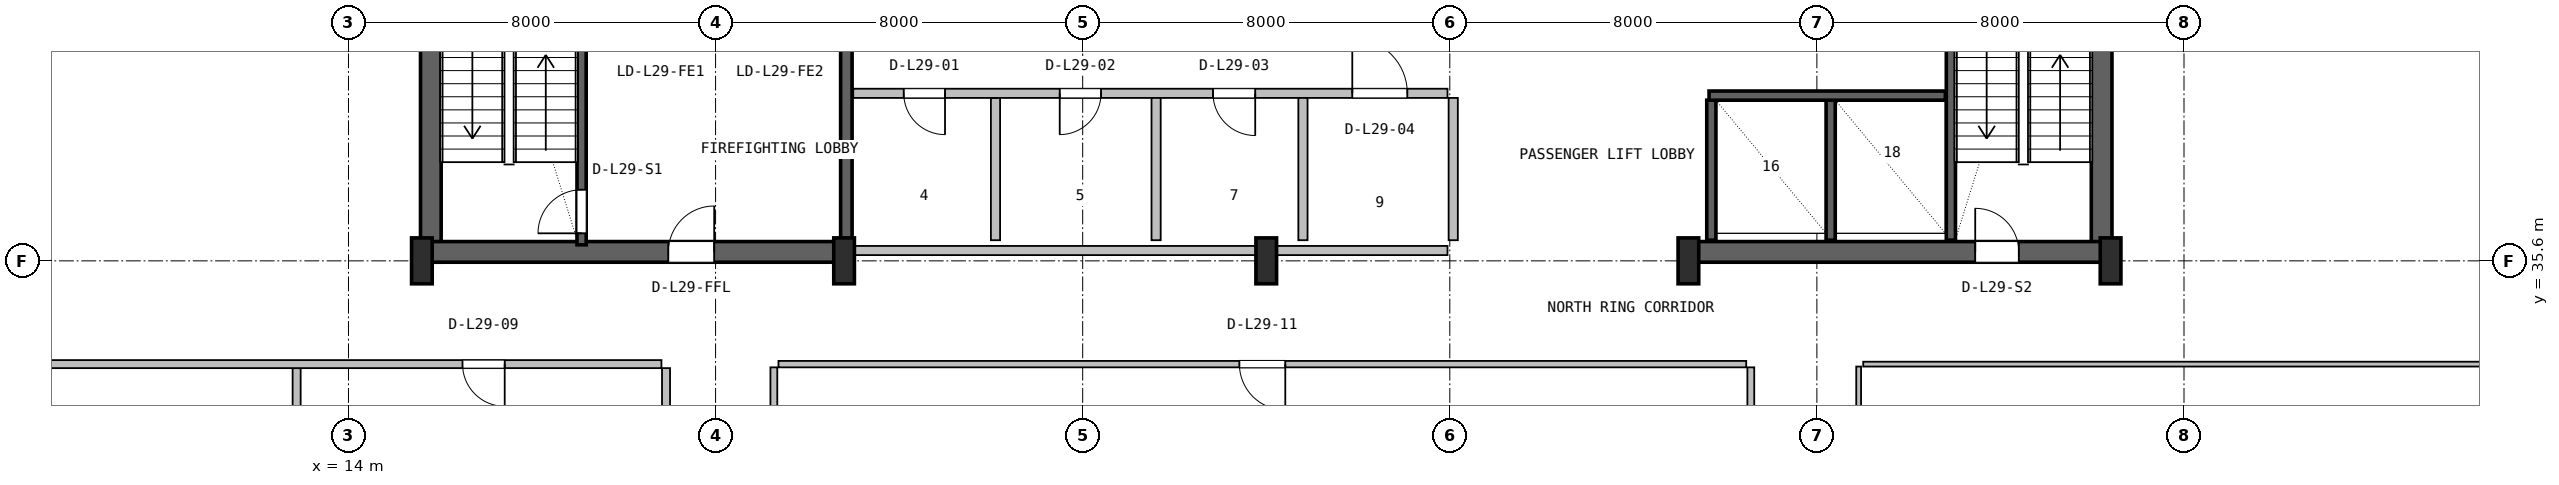
"""IFC4 building model, lengths in metres.
Left out: names, types, materials, properties, quantities, classifications, styles, units other than length and angle.
Written with IfcOpenShell. Run it as: python <this file> out.ifc"""

import sys

from ifc_helpers import new_model, si_unit, direction, frame, frame_2d, origin, origin_2d, place, context, subcontext, project, spatial, rectangle, i_section, extrude, source, transform, mapped, element, fill, save


model = new_model("IFC4")
c1 = context("Model", 3, precision=1e-05, world=origin(), true_north=direction((0.0, 1.0)))
c2 = subcontext(c1, "Body", "Model", "MODEL_VIEW")
j1 = project(units=[si_unit("LENGTHUNIT", "METRE"), si_unit("PLANEANGLEUNIT", "RADIAN")], contexts=[c1])
p1 = place(None, origin())
s1 = spatial("IfcSite", under=j1, at=p1, CompositionType="ELEMENT")
p2 = place(p1, origin())
s2 = spatial("IfcBuilding", under=s1, at=p2, CompositionType="ELEMENT")
p3 = place(p2, frame((0.0, 0.0, 122.0)))
s3 = spatial("IfcBuildingStorey", under=s2, at=p3, CompositionType="ELEMENT", Elevation=122.0)
for number, where, z_axis, x_axis in (
    (1, (15.795, 35.57, 0.0), (0.0, 0.0, 1.0), (0.0, 1.0, 0.0)),
    (2, (52.205, 35.57, 0.0), (0.0, 0.0, 1.0), (0.0, 1.0, 0.0)),
):
    element("IfcWall", number, at=place(p3, frame(where, z_axis=z_axis, x_axis=x_axis)), inside=s3, PredefinedType="SHEAR", context=c2, shape_type="SweptSolid", body=[
        extrude(rectangle(XDim=11.23, YDim=0.45, at=frame_2d((5.615, 0.0))), origin(), (0.0, 0.0, 1.0), 3.55),
    ])
p4 = place(p3, frame((15.57, 35.795, 0.0), z_axis=(0.0, 0.0, 1.0), x_axis=(1.0, 0.0, 0.0)))
e3 = element("IfcWall", 3, at=p4, inside=s3, PredefinedType="SHEAR", context=c2, shape_type="SweptSolid", body=[
    extrude(rectangle(XDim=9.23, YDim=0.45, at=frame_2d((4.615, 0.0))), origin(), (0.0, 0.0, 1.0), 3.55),
])
p5 = place(p4, frame((5.4, 0.0, 0.0)))
e4 = element("IfcOpeningElement", 4, at=p5, cuts=e3, PredefinedType="OPENING", context=c2, shape_type="SweptSolid", body=[
    extrude(rectangle(XDim=1.0, YDim=2.1, at=frame_2d((0.5, 1.05))), frame((0.0, 0.235, 0.0), z_axis=(0.0, -1.0, 0.0), x_axis=(1.0, 0.0, 0.0)), (0.0, 0.0, 1.0), 0.47),
])
p6 = place(p3, frame((43.2, 35.795, 0.0), z_axis=(0.0, 0.0, 1.0), x_axis=(1.0, 0.0, 0.0)))
e5 = element("IfcWall", 5, at=p6, inside=s3, PredefinedType="SHEAR", context=c2, shape_type="SweptSolid", body=[
    extrude(rectangle(XDim=9.23, YDim=0.45, at=frame_2d((4.615, 0.0))), origin(), (0.0, 0.0, 1.0), 3.55),
])
p7 = place(p6, frame((6.25, 0.0, 0.0)))
e6 = element("IfcOpeningElement", 6, at=p7, cuts=e5, PredefinedType="OPENING", context=c2, shape_type="SweptSolid", body=[
    extrude(rectangle(XDim=0.95, YDim=2.1, at=frame_2d((0.475, 1.05))), frame((0.0, 0.235, 0.0), z_axis=(0.0, -1.0, 0.0), x_axis=(1.0, 0.0, 0.0)), (0.0, 0.0, 1.0), 0.47),
])
m1 = source(origin(), c2, "Body", "SweptSolid", [
    extrude(i_section(OverallWidth=0.45, OverallDepth=1.0, WebThickness=0.016, FlangeThickness=0.03, FilletRadius=0.016, at=origin_2d()), origin(), (0.0, 0.0, 1.0), 3.8),
])
for number, where, z_axis, x_axis in (
    (7, (15.6, 35.6, 0.0), (0.0, 0.0, 1.0), (1.0, 0.0, 0.0)),
    (8, (24.8, 35.6, 0.0), (0.0, 0.0, 1.0), (1.0, 0.0, 0.0)),
    (9, (34.0, 35.6, 0.0), (0.0, 0.0, 1.0), (1.0, 0.0, 0.0)),
    (10, (43.2, 35.6, 0.0), (0.0, 0.0, 1.0), (1.0, 0.0, 0.0)),
    (11, (52.4, 35.6, 0.0), (0.0, 0.0, 1.0), (1.0, 0.0, 0.0)),
):
    element("IfcColumn", number, at=place(p3, frame(where, z_axis=z_axis, x_axis=x_axis)), inside=s3, PredefinedType="COLUMN", context=c2, shape_type="MappedRepresentation", body=[
        mapped(m1, transform((0.0, 0.0, 0.0), x_axis=(1.0, 0.0, 0.0), y_axis=(0.0, 1.0, 0.0), z_axis=(0.0, 0.0, 1.0), scale=1.0)),
    ])
p8 = place(p3, frame((19.08, 35.95, 0.0), z_axis=(0.0, 0.0, 1.0), x_axis=(0.0, 1.0, 0.0)))
e12 = element("IfcWall", 12, at=p8, inside=s3, PredefinedType="SHEAR", context=c2, shape_type="SweptSolid", body=[
    extrude(rectangle(XDim=9.65, YDim=0.2, at=frame_2d((4.825, 0.0))), origin(), (0.0, 0.0, 1.0), 3.55),
])
p9 = place(p8, frame((0.25, 0.0, 0.0)))
e13 = element("IfcOpeningElement", 13, at=p9, cuts=e12, PredefinedType="OPENING", context=c2, shape_type="SweptSolid", body=[
    extrude(rectangle(XDim=0.95, YDim=2.1, at=frame_2d((0.475, 1.05))), frame((0.0, 0.11, 0.0), z_axis=(0.0, -1.0, 0.0), x_axis=(1.0, 0.0, 0.0)), (0.0, 0.0, 1.0), 0.22),
])
p10 = place(p3, frame((24.85, 36.05, 0.0), z_axis=(0.0, 0.0, 1.0), x_axis=(0.0, 1.0, 0.0)))
e14 = element("IfcWall", 14, at=p10, inside=s3, PredefinedType="SHEAR", context=c2, shape_type="SweptSolid", body=[
    extrude(rectangle(XDim=10.45, YDim=0.25, at=frame_2d((5.225, 0.0))), origin(), (0.0, 0.0, 1.0), 3.55),
])
p11 = place(p3, frame((48.92, 36.05, 0.0), z_axis=(0.0, 0.0, 1.0), x_axis=(0.0, 1.0, 0.0)))
e15 = element("IfcWall", 15, at=p11, inside=s3, PredefinedType="SHEAR", context=c2, shape_type="SweptSolid", body=[
    extrude(rectangle(XDim=10.5, YDim=0.2, at=frame_2d((5.25, 0.0))), origin(), (0.0, 0.0, 1.0), 3.55),
])
for number, where, z_axis, x_axis in (
    (16, (43.7, 36.05, 0.0), (0.0, 0.0, 1.0), (0.0, 1.0, 0.0)),
    (17, (46.3, 36.05, 0.0), (0.0, 0.0, 1.0), (0.0, 1.0, 0.0)),
):
    element("IfcWall", number, at=place(p3, frame(where, z_axis=z_axis, x_axis=x_axis)), inside=s3, PredefinedType="SHEAR", context=c2, shape_type="SweptSolid", body=[
        extrude(rectangle(XDim=3.05, YDim=0.2, at=frame_2d((1.525, 0.0))), origin(), (0.0, 0.0, 1.0), 3.55),
    ])
p12 = place(p3, frame((43.65, 39.2, 0.0), z_axis=(0.0, 0.0, 1.0), x_axis=(1.0, 0.0, 0.0)))
e18 = element("IfcWall", 18, at=p12, inside=s3, PredefinedType="SHEAR", context=c2, shape_type="SweptSolid", body=[
    extrude(rectangle(XDim=5.15, YDim=0.2, at=frame_2d((2.575, 0.0))), origin(), (0.0, 0.0, 1.0), 3.55),
])
p13 = place(p3, frame((25.0, 35.825, 0.0), z_axis=(0.0, 0.0, 1.0), x_axis=(1.0, 0.0, 0.0)))
e19 = element("IfcWall", 19, at=p13, inside=s3, PredefinedType="SOLIDWALL", context=c2, shape_type="SweptSolid", body=[
    extrude(rectangle(XDim=12.95, YDim=0.2, at=frame_2d((6.475, 0.0))), origin(), (0.0, 0.0, 1.0), 2.325),
])
p14 = place(p3, frame((28.1, 36.05, 0.0), z_axis=(0.0, 0.0, 1.0), x_axis=(0.0, 1.0, 0.0)))
e20 = element("IfcWall", 20, at=p14, inside=s3, PredefinedType="PLUMBINGWALL", context=c2, shape_type="SweptSolid", body=[
    extrude(rectangle(XDim=3.1, YDim=0.2, at=frame_2d((1.55, 0.0))), origin(), (0.0, 0.0, 1.0), 3.53),
])
p15 = place(p3, frame((25.0, 39.25, 0.0), z_axis=(0.0, 0.0, 1.0), x_axis=(1.0, 0.0, 0.0)))
e21 = element("IfcWall", 21, at=p15, inside=s3, PredefinedType="SOLIDWALL", context=c2, shape_type="SweptSolid", body=[
    extrude(rectangle(XDim=12.95, YDim=0.2, at=frame_2d((6.475, 0.0))), origin(), (0.0, 0.0, 1.0), 3.53),
])
p16 = place(p15, frame((1.1, 0.0, 0.0)))
e22 = element("IfcOpeningElement", 22, at=p16, cuts=e21, PredefinedType="OPENING", context=c2, shape_type="SweptSolid", body=[
    extrude(rectangle(XDim=0.9, YDim=2.06, at=frame_2d((0.45, 1.03))), frame((0.0, 0.11, 0.0), z_axis=(0.0, -1.0, 0.0), x_axis=(1.0, 0.0, 0.0)), (0.0, 0.0, 1.0), 0.22),
])
p17 = place(p15, frame((4.5, 0.0, 0.0)))
e23 = element("IfcOpeningElement", 23, at=p17, cuts=e21, PredefinedType="OPENING", context=c2, shape_type="SweptSolid", body=[
    extrude(rectangle(XDim=0.9, YDim=2.06, at=frame_2d((0.45, 1.03))), frame((0.0, 0.11, 0.0), z_axis=(0.0, -1.0, 0.0), x_axis=(1.0, 0.0, 0.0)), (0.0, 0.0, 1.0), 0.22),
])
p18 = place(p15, frame((7.84, 0.0, 0.0)))
e24 = element("IfcOpeningElement", 24, at=p18, cuts=e21, PredefinedType="OPENING", context=c2, shape_type="SweptSolid", body=[
    extrude(rectangle(XDim=0.92, YDim=2.08, at=frame_2d((0.46, 1.04))), frame((0.0, 0.11, 0.0), z_axis=(0.0, -1.0, 0.0), x_axis=(1.0, 0.0, 0.0)), (0.0, 0.0, 1.0), 0.22),
])
p19 = place(p15, frame((10.875, 0.0, 0.0)))
e25 = element("IfcOpeningElement", 25, at=p19, cuts=e21, PredefinedType="OPENING", context=c2, shape_type="SweptSolid", body=[
    extrude(rectangle(XDim=1.2, YDim=2.1, at=frame_2d((0.6, 1.05))), frame((0.0, 0.11, 0.0), z_axis=(0.0, -1.0, 0.0), x_axis=(1.0, 0.0, 0.0)), (0.0, 0.0, 1.0), 0.22),
])
p20 = place(p3, frame((31.6, 36.05, 0.0), z_axis=(0.0, 0.0, 1.0), x_axis=(0.0, 1.0, 0.0)))
e26 = element("IfcWall", 26, at=p20, inside=s3, PredefinedType="PLUMBINGWALL", context=c2, shape_type="SweptSolid", body=[
    extrude(rectangle(XDim=3.1, YDim=0.2, at=frame_2d((1.55, 0.0))), origin(), (0.0, 0.0, 1.0), 3.53),
])
for number, where, z_axis, x_axis in (
    (27, (34.8, 36.05, 0.0), (0.0, 0.0, 1.0), (0.0, 1.0, 0.0)),
    (28, (38.075, 36.05, 0.0), (0.0, 0.0, 1.0), (0.0, 1.0, 0.0)),
):
    element("IfcWall", number, at=place(p3, frame(where, z_axis=z_axis, x_axis=x_axis)), inside=s3, PredefinedType="SOLIDWALL", context=c2, shape_type="SweptSolid", body=[
        extrude(rectangle(XDim=3.1, YDim=0.2, at=frame_2d((1.55, 0.0))), origin(), (0.0, 0.0, 1.0), 3.53),
    ])
p21 = place(p3, frame((20.92, 13.47, 0.0), z_axis=(0.0, 0.0, 1.0), x_axis=(0.0, 1.0, 0.0)))
e29 = element("IfcWall", 29, at=p21, inside=s3, PredefinedType="PARTITIONING", context=c2, shape_type="SweptSolid", body=[
    extrude(rectangle(XDim=19.793, YDim=0.175, at=frame_2d((9.896, 0.0))), origin(), (0.0, 0.0, 1.0), 3.222),
])
p22 = place(p21, frame((5.775, 0.0, 0.0)))
e30 = element("IfcOpeningElement", 30, at=p22, cuts=e29, PredefinedType="OPENING", context=c2, shape_type="SweptSolid", body=[
    extrude(rectangle(XDim=1.05, YDim=2.1, at=frame_2d((0.525, 1.05))), frame((0.0, 0.098, 0.0), z_axis=(0.0, -1.0, 0.0), x_axis=(1.0, 0.0, 0.0)), (0.0, 0.0, 1.0), 0.195),
])
p23 = place(p3, frame((12.87, 26.127, 0.0), z_axis=(0.0, 0.0, 1.0), x_axis=(0.0, 1.0, 0.0)))
e31 = element("IfcWall", 31, at=p23, inside=s3, PredefinedType="PARTITIONING", context=c2, shape_type="SweptSolid", body=[
    extrude(rectangle(XDim=7.136, YDim=0.175, at=frame_2d((3.568, 0.0))), origin(), (0.0, 0.0, 1.0), 3.222),
])
p24 = place(p3, frame((4.68, 33.35, 0.0), z_axis=(0.0, 0.0, 1.0), x_axis=(1.0, 0.0, 0.0)))
e32 = element("IfcWall", 32, at=p24, inside=s3, PredefinedType="PARTITIONING", context=c2, shape_type="SweptSolid", body=[
    extrude(rectangle(XDim=16.14, YDim=0.175, at=frame_2d((8.07, 0.0))), origin(), (0.0, 0.0, 1.0), 3.108),
])
p25 = place(p24, frame((11.805, 0.0, 0.0)))
e33 = element("IfcOpeningElement", 33, at=p25, cuts=e32, PredefinedType="OPENING", context=c2, shape_type="SweptSolid", body=[
    extrude(rectangle(XDim=0.92, YDim=2.08, at=frame_2d((0.46, 1.04))), frame((0.0, 0.098, 0.0), z_axis=(0.0, -1.0, 0.0), x_axis=(1.0, 0.0, 0.0)), (0.0, 0.0, 1.0), 0.195),
])
for number, where, z_axis, x_axis in (
    (34, (44.56, 15.825, 0.0), (0.0, 0.0, 1.0), (0.0, 1.0, 0.0)),
    (35, (23.27, 15.825, 0.0), (0.0, 0.0, 1.0), (0.0, 1.0, 0.0)),
):
    element("IfcWall", number, at=place(p3, frame(where, z_axis=z_axis, x_axis=x_axis)), inside=s3, PredefinedType="PARTITIONING", context=c2, shape_type="SweptSolid", body=[
        extrude(rectangle(XDim=17.455, YDim=0.15, at=frame_2d((8.728, 0.0))), origin(), (0.0, 0.0, 1.0), 3.222),
    ])
p26 = place(p3, frame((23.37, 33.35, 0.0), z_axis=(0.0, 0.0, 1.0), x_axis=(1.0, 0.0, 0.0)))
e36 = element("IfcWall", 36, at=p26, inside=s3, PredefinedType="PARTITIONING", context=c2, shape_type="SweptSolid", body=[
    extrude(rectangle(XDim=21.09, YDim=0.14, at=frame_2d((10.545, 0.0))), origin(), (0.0, 0.0, 1.0), 2.83),
])
p27 = place(p26, frame((10.045, 0.0, 0.0)))
e37 = element("IfcOpeningElement", 37, at=p27, cuts=e36, PredefinedType="OPENING", context=c2, shape_type="SweptSolid", body=[
    extrude(rectangle(XDim=1.0, YDim=2.1, at=frame_2d((0.5, 1.05))), frame((0.0, 0.08, 0.0), z_axis=(0.0, -1.0, 0.0), x_axis=(1.0, 0.0, 0.0)), (0.0, 0.0, 1.0), 0.16),
])
p28 = place(p3, frame((47.01, 33.35, 0.0), z_axis=(0.0, 0.0, 1.0), x_axis=(1.0, 0.0, 0.0)))
e38 = element("IfcWall", 38, at=p28, inside=s3, PredefinedType="PARTITIONING", context=c2, shape_type="SweptSolid", body=[
    extrude(rectangle(XDim=16.31, YDim=0.105, at=frame_2d((8.155, 0.0))), origin(), (0.0, 0.0, 1.0), 3.108),
])
p29 = place(p3, frame((46.91, 13.47, 0.0), z_axis=(0.0, 0.0, 1.0), x_axis=(0.0, 1.0, 0.0)))
e39 = element("IfcWall", 39, at=p29, inside=s3, PredefinedType="PARTITIONING", context=c2, shape_type="SweptSolid", body=[
    extrude(rectangle(XDim=19.827, YDim=0.105, at=frame_2d((9.914, 0.0))), origin(), (0.0, 0.0, 1.0), 3.222),
])
p30 = place(p29, frame((9.465, 0.0, 0.0)))
e40 = element("IfcOpeningElement", 40, at=p30, cuts=e39, PredefinedType="OPENING", context=c2, shape_type="SweptSolid", body=[
    extrude(rectangle(XDim=0.88, YDim=2.06, at=frame_2d((0.44, 1.03))), frame((0.0, 0.062, 0.0), z_axis=(0.0, -1.0, 0.0), x_axis=(1.0, 0.0, 0.0)), (0.0, 0.0, 1.0), 0.125),
])
m2 = source(origin(), c2, "Body", "SweptSolid", [
    extrude(rectangle(XDim=0.95, YDim=2.1, at=frame_2d((0.475, 1.05))), frame((0.0, 0.025, 0.0), z_axis=(0.0, -1.0, 0.0), x_axis=(1.0, 0.0, 0.0)), (0.0, 0.0, 1.0), 0.05),
])
p31 = place(p9, origin())
e41 = element("IfcDoor", 41, at=p31, inside=s3, OperationType="SINGLE_SWING_LEFT", PredefinedType="DOOR", context=c2, shape_type="MappedRepresentation", body=[
    mapped(m2, transform((0.0, 0.0, 0.0), x_axis=(1.0, 0.0, 0.0), y_axis=(0.0, 1.0, 0.0), z_axis=(0.0, 0.0, 1.0), scale=1.0)),
])
fill(e13, e41)
m3 = source(origin(), c2, "Body", "SweptSolid", [
    extrude(rectangle(XDim=1.0, YDim=2.1, at=frame_2d((0.5, 1.05))), frame((0.0, 0.025, 0.0), z_axis=(0.0, -1.0, 0.0), x_axis=(1.0, 0.0, 0.0)), (0.0, 0.0, 1.0), 0.05),
])
p32 = place(p5, origin())
e42 = element("IfcDoor", 42, at=p32, inside=s3, OperationType="SINGLE_SWING_RIGHT", PredefinedType="DOOR", context=c2, shape_type="MappedRepresentation", body=[
    mapped(m3, transform((0.0, 0.0, 0.0), x_axis=(1.0, 0.0, 0.0), y_axis=(0.0, 1.0, 0.0), z_axis=(0.0, 0.0, 1.0), scale=1.0)),
])
fill(e4, e42)
p33 = place(p7, origin())
e43 = element("IfcDoor", 43, at=p33, inside=s3, OperationType="SINGLE_SWING_LEFT", PredefinedType="DOOR", context=c2, shape_type="MappedRepresentation", body=[
    mapped(m2, transform((0.0, 0.0, 0.0), x_axis=(1.0, 0.0, 0.0), y_axis=(0.0, 1.0, 0.0), z_axis=(0.0, 0.0, 1.0), scale=1.0)),
])
fill(e6, e43)
m4 = source(origin(), c2, "Body", "SweptSolid", [
    extrude(rectangle(XDim=0.9, YDim=2.06, at=frame_2d((0.45, 1.03))), frame((0.0, 0.025, 0.0), z_axis=(0.0, -1.0, 0.0), x_axis=(1.0, 0.0, 0.0)), (0.0, 0.0, 1.0), 0.05),
])
p34 = place(p16, frame((0.9, 0.0, 0.0), z_axis=(0.0, 0.0, 1.0), x_axis=(-1.0, 0.0, 0.0)))
e44 = element("IfcDoor", 44, at=p34, inside=s3, OperationType="SINGLE_SWING_RIGHT", PredefinedType="DOOR", context=c2, shape_type="MappedRepresentation", body=[
    mapped(m4, transform((0.0, 0.0, 0.0), x_axis=(1.0, 0.0, 0.0), y_axis=(0.0, 1.0, 0.0), z_axis=(0.0, 0.0, 1.0), scale=1.0)),
])
fill(e22, e44)
p35 = place(p17, frame((0.9, 0.0, 0.0), z_axis=(0.0, 0.0, 1.0), x_axis=(-1.0, 0.0, 0.0)))
e45 = element("IfcDoor", 45, at=p35, inside=s3, OperationType="SINGLE_SWING_LEFT", PredefinedType="DOOR", context=c2, shape_type="MappedRepresentation", body=[
    mapped(m4, transform((0.0, 0.0, 0.0), x_axis=(1.0, 0.0, 0.0), y_axis=(0.0, 1.0, 0.0), z_axis=(0.0, 0.0, 1.0), scale=1.0)),
])
fill(e23, e45)
m5 = source(origin(), c2, "Body", "SweptSolid", [
    extrude(rectangle(XDim=0.92, YDim=2.08, at=frame_2d((0.46, 1.04))), frame((0.0, 0.025, 0.0), z_axis=(0.0, -1.0, 0.0), x_axis=(1.0, 0.0, 0.0)), (0.0, 0.0, 1.0), 0.05),
])
p36 = place(p18, frame((0.92, 0.0, 0.0), z_axis=(0.0, 0.0, 1.0), x_axis=(-1.0, 0.0, 0.0)))
e46 = element("IfcDoor", 46, at=p36, inside=s3, OperationType="SINGLE_SWING_RIGHT", PredefinedType="DOOR", context=c2, shape_type="MappedRepresentation", body=[
    mapped(m5, transform((0.0, 0.0, 0.0), x_axis=(1.0, 0.0, 0.0), y_axis=(0.0, 1.0, 0.0), z_axis=(0.0, 0.0, 1.0), scale=1.0)),
])
fill(e24, e46)
m6 = source(origin(), c2, "Body", "SweptSolid", [
    extrude(rectangle(XDim=1.2, YDim=2.1, at=frame_2d((0.6, 1.05))), frame((0.0, 0.025, 0.0), z_axis=(0.0, -1.0, 0.0), x_axis=(1.0, 0.0, 0.0)), (0.0, 0.0, 1.0), 0.05),
])
p37 = place(p19, origin())
e47 = element("IfcDoor", 47, at=p37, inside=s3, OperationType="SINGLE_SWING_LEFT", PredefinedType="DOOR", context=c2, shape_type="MappedRepresentation", body=[
    mapped(m6, transform((0.0, 0.0, 0.0), x_axis=(1.0, 0.0, 0.0), y_axis=(0.0, 1.0, 0.0), z_axis=(0.0, 0.0, 1.0), scale=1.0)),
])
fill(e25, e47)
p38 = place(p25, frame((0.92, 0.0, 0.0), z_axis=(0.0, 0.0, 1.0), x_axis=(-1.0, 0.0, 0.0)))
e48 = element("IfcDoor", 48, at=p38, inside=s3, OperationType="SINGLE_SWING_RIGHT", PredefinedType="DOOR", context=c2, shape_type="MappedRepresentation", body=[
    mapped(m5, transform((0.0, 0.0, 0.0), x_axis=(1.0, 0.0, 0.0), y_axis=(0.0, 1.0, 0.0), z_axis=(0.0, 0.0, 1.0), scale=1.0)),
])
fill(e33, e48)
m7 = source(origin(), c2, "Body", "SweptSolid", [
    extrude(rectangle(XDim=1.0, YDim=2.1, at=frame_2d((0.5, 1.05))), frame((0.0, 0.025, 0.0), z_axis=(0.0, -1.0, 0.0), x_axis=(1.0, 0.0, 0.0)), (0.0, 0.0, 1.0), 0.05),
])
p39 = place(p27, frame((1.0, 0.0, 0.0), z_axis=(0.0, 0.0, 1.0), x_axis=(-1.0, 0.0, 0.0)))
e49 = element("IfcDoor", 49, at=p39, inside=s3, OperationType="SINGLE_SWING_RIGHT", PredefinedType="DOOR", context=c2, shape_type="MappedRepresentation", body=[
    mapped(m7, transform((0.0, 0.0, 0.0), x_axis=(1.0, 0.0, 0.0), y_axis=(0.0, 1.0, 0.0), z_axis=(0.0, 0.0, 1.0), scale=1.0)),
])
fill(e37, e49)
save(model, sys.argv[1])
